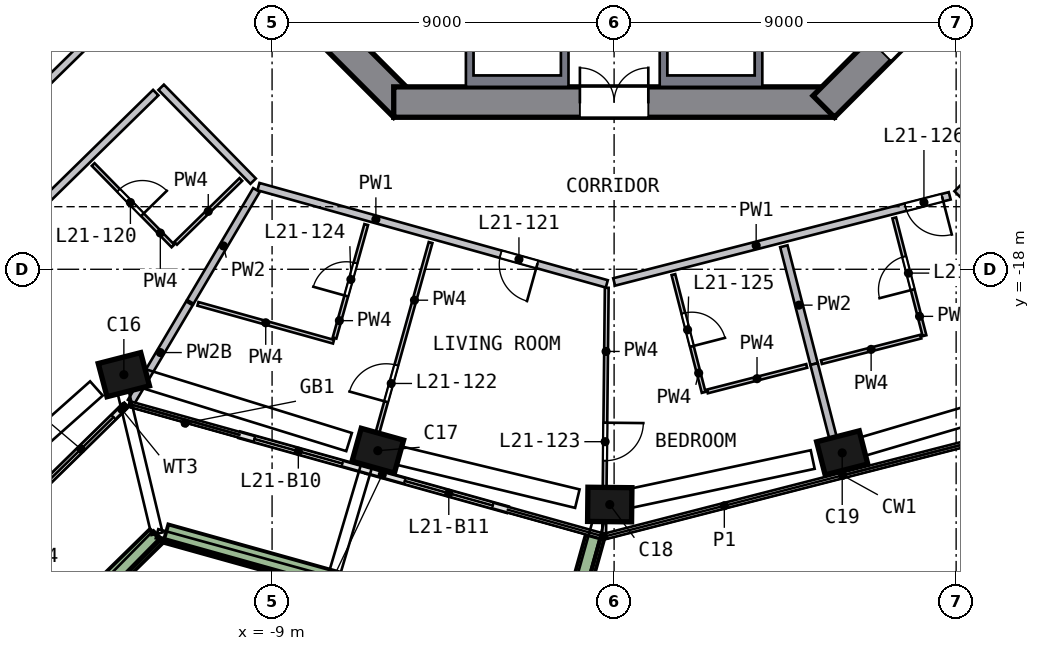
"""IFC4 building model, lengths in metres.
Left out: names, types, materials, properties, quantities, classifications, styles, units other than length and angle.
Written with IfcOpenShell. Run it as: python <this file> out.ifc"""

import sys

from ifc_helpers import new_model, si_unit, direction, frame, frame_2d, origin, origin_2d, place, context, subcontext, project, spatial, polyline, rectangle, outline, extrude, element, fill, save


model = new_model("IFC4")
c1 = context("Model", 3, precision=1e-05, world=origin(), true_north=direction((0.0, 1.0)))
c2 = subcontext(c1, "Body", "Model", "MODEL_VIEW")
j1 = project(units=[si_unit("LENGTHUNIT", "METRE"), si_unit("PLANEANGLEUNIT", "RADIAN")], contexts=[c1])
p1 = place(None, origin())
s1 = spatial("IfcSite", under=j1, at=p1, CompositionType="ELEMENT")
p2 = place(p1, origin())
s2 = spatial("IfcBuilding", under=s1, at=p2, CompositionType="ELEMENT")
p3 = place(p2, frame((0.0, 0.0, 93.0)))
s3 = spatial("IfcBuildingStorey", under=s2, at=p3, CompositionType="ELEMENT", Elevation=93.0)
p4 = place(p3, frame((-13.02, -20.7, 0.0), z_axis=(0.098896689, -0.061040769, 0.993223776), x_axis=(-0.963723758, -0.254530475, 0.080316596)))
e1 = element("IfcColumn", 1, at=p4, inside=s3, PredefinedType="COLUMN", context=c2, shape_type="SweptSolid", body=[
    extrude(rectangle(XDim=1.15, YDim=0.9, at=origin_2d()), origin(), (0.0, 0.0, 1.0), 3.212),
])
p5 = place(p3, frame((-6.349, -22.739, 0.0), z_axis=(0.108372319, -0.029279539, 0.993679098), x_axis=(0.957051078, -0.267305592, -0.112253975)))
e2 = element("IfcColumn", 2, at=p5, inside=s3, PredefinedType="COLUMN", context=c2, shape_type="SweptSolid", body=[
    extrude(rectangle(XDim=1.15, YDim=0.9, at=origin_2d()), origin(), (0.0, 0.0, 1.0), 3.21),
])
p6 = place(p3, frame((-0.253, -24.191, 0.0), z_axis=(0.11510311, -0.000228077, 0.993353523), x_axis=(-0.993299538, 0.010401576, 0.115099243)))
e3 = element("IfcColumn", 3, at=p6, inside=s3, PredefinedType="COLUMN", context=c2, shape_type="SweptSolid", body=[
    extrude(rectangle(XDim=1.15, YDim=0.9, at=origin_2d()), origin(), (0.0, 0.0, 1.0), 3.211),
])
p7 = place(p3, frame((5.871, -22.867, 0.0), z_axis=(0.108524069, 0.028823141, 0.993675879), x_axis=(0.962510976, 0.246911463, -0.112282459)))
e4 = element("IfcColumn", 4, at=p7, inside=s3, PredefinedType="COLUMN", context=c2, shape_type="SweptSolid", body=[
    extrude(rectangle(XDim=1.15, YDim=0.9, at=origin_2d()), origin(), (0.0, 0.0, 1.0), 3.21),
])
p8 = place(p3, frame((-13.717, -5.516, 0.0), z_axis=(0.0, 0.0, 1.0), x_axis=(0.707106781, -0.707106781, 0.0)))
e5 = element("IfcWall", 5, at=p8, inside=s3, PredefinedType="SHEAR", context=c2, shape_type="SweptSolid", body=[
    extrude(rectangle(XDim=11.598, YDim=0.8, at=frame_2d((5.799, 0.0))), origin(), (0.0, 0.0, 1.0), 3.5),
])
p9 = place(p8, frame((2.099, 0.0, 0.0)))
e6 = element("IfcOpeningElement", 6, at=p9, cuts=e5, PredefinedType="OPENING", context=c2, shape_type="SweptSolid", body=[
    extrude(rectangle(XDim=1.2, YDim=2.1, at=frame_2d((0.6, 1.05))), frame((0.0, 0.41, 0.0), z_axis=(0.0, -1.0, 0.0), x_axis=(1.0, 0.0, 0.0)), (0.0, 0.0, 1.0), 0.82),
])
p10 = place(p3, frame((-5.799, -13.6, 0.0), z_axis=(0.0, 0.0, 1.0), x_axis=(1.0, 0.0, 0.0)))
e7 = element("IfcWall", 7, at=p10, inside=s3, PredefinedType="SHEAR", context=c2, shape_type="SweptSolid", body=[
    extrude(rectangle(XDim=11.598, YDim=0.8, at=frame_2d((5.799, 0.0))), origin(), (0.0, 0.0, 1.0), 3.5),
])
p11 = place(p10, frame((4.899, 0.0, 0.0)))
e8 = element("IfcOpeningElement", 8, at=p11, cuts=e7, PredefinedType="OPENING", context=c2, shape_type="SweptSolid", body=[
    extrude(rectangle(XDim=1.8, YDim=2.1, at=frame_2d((0.9, 1.05))), frame((0.0, 0.41, 0.0), z_axis=(0.0, -1.0, 0.0), x_axis=(1.0, 0.0, 0.0)), (0.0, 0.0, 1.0), 0.82),
])
p12 = place(p3, frame((5.516, -13.717, 0.0), z_axis=(0.0, 0.0, 1.0), x_axis=(0.707106781, 0.707106781, 0.0)))
e9 = element("IfcWall", 9, at=p12, inside=s3, PredefinedType="SHEAR", context=c2, shape_type="SweptSolid", body=[
    extrude(rectangle(XDim=11.598, YDim=0.8, at=frame_2d((5.799, 0.0))), origin(), (0.0, 0.0, 1.0), 3.5),
])
p13 = place(p12, frame((2.099, 0.0, 0.0)))
e10 = element("IfcOpeningElement", 10, at=p13, cuts=e9, PredefinedType="OPENING", context=c2, shape_type="SweptSolid", body=[
    extrude(rectangle(XDim=1.2, YDim=2.1, at=frame_2d((0.6, 1.05))), frame((0.0, 0.41, 0.0), z_axis=(0.0, -1.0, 0.0), x_axis=(1.0, 0.0, 0.0)), (0.0, 0.0, 1.0), 0.82),
])
p14 = place(p3, frame((-15.173, -23.851, 0.0), z_axis=(0.0, 0.0, 1.0), x_axis=(0.714468315, 0.699667797, 0.0)))
e11 = element("IfcWall", 11, at=p14, inside=s3, PredefinedType="SOLIDWALL", context=c2, shape_type="SweptSolid", body=[
    extrude(rectangle(XDim=3.2, YDim=0.15, at=frame_2d((1.6, 0.0))), origin(), (0.0, 0.0, 1.0), 2.425),
])
p15 = place(p14, frame((0.4, 0.0, 0.0)))
e12 = element("IfcOpeningElement", 12, at=p15, cuts=e11, PredefinedType="OPENING", context=c2, shape_type="SweptSolid", body=[
    extrude(rectangle(XDim=2.4, YDim=2.4, at=frame_2d((1.2, 1.2))), frame((0.0, 0.085, 0.0), z_axis=(0.0, -1.0, 0.0), x_axis=(1.0, 0.0, 0.0)), (0.0, 0.0, 1.0), 0.17),
])
p16 = place(p3, frame((-9.85, -22.358, 0.0), z_axis=(0.0, 0.0, 1.0), x_axis=(0.96315568, -0.268944485, 0.0)))
e13 = element("IfcWall", 13, at=p16, inside=s3, PredefinedType="SOLIDWALL", context=c2, shape_type="SweptSolid", body=[
    extrude(rectangle(XDim=3.475, YDim=0.15, at=frame_2d((1.737, 0.0))), origin(), (0.0, 0.0, 1.0), 2.425),
])
p17 = place(p16, frame((0.4, 0.0, 0.0)))
e14 = element("IfcOpeningElement", 14, at=p17, cuts=e13, PredefinedType="OPENING", context=c2, shape_type="SweptSolid", body=[
    extrude(rectangle(XDim=2.4, YDim=2.4, at=frame_2d((1.2, 1.2))), frame((0.0, 0.085, 0.0), z_axis=(0.0, -1.0, 0.0), x_axis=(1.0, 0.0, 0.0)), (0.0, 0.0, 1.0), 0.17),
])
p18 = place(p3, frame((-6.503, -23.292, 0.0), z_axis=(0.0, 0.0, 1.0), x_axis=(0.963161418, -0.268923935, 0.0)))
e15 = element("IfcWall", 15, at=p18, inside=s3, PredefinedType="SOLIDWALL", context=c2, shape_type="SweptSolid", body=[
    extrude(rectangle(XDim=3.836, YDim=0.15, at=frame_2d((1.918, 0.0))), origin(), (0.0, 0.0, 1.0), 2.425),
])
p19 = place(p18, frame((1.035, 0.0, 0.0)))
e16 = element("IfcOpeningElement", 16, at=p19, cuts=e15, PredefinedType="OPENING", context=c2, shape_type="SweptSolid", body=[
    extrude(rectangle(XDim=2.4, YDim=2.4, at=frame_2d((1.2, 1.2))), frame((0.0, 0.085, 0.0), z_axis=(0.0, -1.0, 0.0), x_axis=(1.0, 0.0, 0.0)), (0.0, 0.0, 1.0), 0.17),
])
p20 = place(p3, frame((-19.168, -31.997, 0.0), z_axis=(0.0, 0.0, 1.0), x_axis=(0.714470668, 0.699665395, 0.0)))
e17 = element("IfcWall", 17, at=p20, inside=s3, PredefinedType="SOLIDWALL", context=c2, shape_type="SweptSolid", body=[
    extrude(rectangle(XDim=9.977, YDim=0.5, at=frame_2d((4.988, 0.0))), origin(), (0.0, 0.0, 1.0), 0.7),
])
p21 = place(p3, frame((-11.798, -24.955, 0.0), z_axis=(0.0, 0.0, 1.0), x_axis=(0.963157935, -0.26893641, 0.0)))
e18 = element("IfcWall", 18, at=p21, inside=s3, PredefinedType="SOLIDWALL", context=c2, shape_type="SweptSolid", body=[
    extrude(rectangle(XDim=11.152, YDim=0.5, at=frame_2d((5.576, 0.0))), origin(), (0.0, 0.0, 1.0), 0.7),
])
p22 = place(p3, frame((-1.23, -27.646, 0.0), z_axis=(0.0, 0.0, 1.0), x_axis=(0.268921917, 0.963161982, 0.0)))
e19 = element("IfcWall", 19, at=p22, inside=s3, PredefinedType="SOLIDWALL", context=c2, shape_type="SweptSolid", body=[
    extrude(rectangle(XDim=2.699, YDim=0.5, at=frame_2d((1.35, 0.0))), origin(), (0.0, 0.0, 1.0), 0.7),
])
p23 = place(p3, origin())
e20 = element("IfcWall", 20, at=p23, inside=s3, PredefinedType="SOLIDWALL", context=c2, shape_type="SweptSolid", body=[
    extrude(outline(polyline([(-1.2, -13.2), (-3.9, -13.2), (-3.9, -10.7), (-1.2, -10.7), (-1.2, -13.2)]), holes=[polyline([(-3.7, -10.9), (-3.7, -12.9), (-1.4, -12.9), (-1.4, -10.9), (-3.7, -10.9)])]), origin(), (0.0, 0.0, 1.0), 3.19),
])
p24 = place(p3, origin())
e21 = element("IfcWall", 21, at=p24, inside=s3, PredefinedType="SOLIDWALL", context=c2, shape_type="SweptSolid", body=[
    extrude(outline(polyline([(3.9, -10.7), (3.9, -13.2), (1.2, -13.2), (1.2, -10.7), (3.9, -10.7)]), holes=[polyline([(1.4, -12.9), (3.7, -12.9), (3.7, -10.9), (1.4, -10.9), (1.4, -12.9)])]), origin(), (0.0, 0.0, 1.0), 3.19),
])
p25 = place(p3, frame((-26.907, -24.809, 0.0), z_axis=(0.0, 0.0, 1.0), x_axis=(0.714474521, 0.699661461, 0.0)))
e22 = element("IfcWall", 22, at=p25, inside=s3, PredefinedType="SOLIDWALL", context=c2, shape_type="SweptSolid", body=[
    extrude(rectangle(XDim=18.624, YDim=0.2, at=frame_2d((9.312, 0.0))), origin(), (0.0, 0.0, 1.0), 3.19),
])
p26 = place(p25, frame((2.6, 0.0, 0.0)))
e23 = element("IfcOpeningElement", 23, at=p26, cuts=e22, PredefinedType="OPENING", context=c2, shape_type="SweptSolid", body=[
    extrude(rectangle(XDim=1.0, YDim=2.1, at=frame_2d((0.5, 1.05))), frame((0.0, 0.11, 0.0), z_axis=(0.0, -1.0, 0.0), x_axis=(1.0, 0.0, 0.0)), (0.0, 0.0, 1.0), 0.22),
])
p27 = place(p3, frame((-12.061, -13.351, 0.0), z_axis=(0.0, 0.0, 1.0), x_axis=(-0.714474521, -0.699661461, 0.0)))
e24 = element("IfcWall", 24, at=p27, inside=s3, PredefinedType="SOLIDWALL", context=c2, shape_type="SweptSolid", body=[
    extrude(rectangle(XDim=18.624, YDim=0.2, at=frame_2d((9.312, 0.0))), origin(), (0.0, 0.0, 1.0), 3.19),
])
p28 = place(p27, frame((7.0, 0.0, 0.0)))
e25 = element("IfcOpeningElement", 25, at=p28, cuts=e24, PredefinedType="OPENING", context=c2, shape_type="SweptSolid", body=[
    extrude(rectangle(XDim=1.0, YDim=2.1, at=frame_2d((0.5, 1.05))), frame((0.0, 0.11, 0.0), z_axis=(0.0, -1.0, 0.0), x_axis=(1.0, 0.0, 0.0)), (0.0, 0.0, 1.0), 0.22),
])
p29 = place(p3, frame((-11.918, -13.211, 0.0), z_axis=(0.0, 0.0, 1.0), x_axis=(0.699655576, -0.714480283, 0.0)))
e26 = element("IfcWall", 26, at=p29, inside=s3, PredefinedType="SOLIDWALL", context=c2, shape_type="SweptSolid", body=[
    extrude(rectangle(XDim=3.458, YDim=0.2, at=frame_2d((1.729, 0.0))), origin(), (0.0, 0.0, 1.0), 3.19),
])
p30 = place(p3, frame((-0.192, -18.384, 0.0), z_axis=(0.0, 0.0, 1.0), x_axis=(-0.963160921, 0.268925714, 0.0)))
e27 = element("IfcWall", 27, at=p30, inside=s3, PredefinedType="SOLIDWALL", context=c2, shape_type="SweptSolid", body=[
    extrude(rectangle(XDim=9.517, YDim=0.2, at=frame_2d((4.758, 0.0))), origin(), (0.0, 0.0, 1.0), 3.19),
])
p31 = place(p30, frame((1.9, 0.0, 0.0)))
e28 = element("IfcOpeningElement", 28, at=p31, cuts=e27, PredefinedType="OPENING", context=c2, shape_type="SweptSolid", body=[
    extrude(rectangle(XDim=1.0, YDim=2.1, at=frame_2d((0.5, 1.05))), frame((0.0, 0.11, 0.0), z_axis=(0.0, -1.0, 0.0), x_axis=(1.0, 0.0, 0.0)), (0.0, 0.0, 1.0), 0.22),
])
p32 = place(p3, frame((8.831, -16.067, 0.0), z_axis=(0.0, 0.0, 1.0), x_axis=(-0.968582197, -0.248693643, 0.0)))
e29 = element("IfcWall", 29, at=p32, inside=s3, PredefinedType="SOLIDWALL", context=c2, shape_type="SweptSolid", body=[
    extrude(rectangle(XDim=9.116, YDim=0.2, at=frame_2d((4.558, 0.0))), origin(), (0.0, 0.0, 1.0), 3.19),
])
p33 = place(p32, frame((0.2, 0.0, 0.0)))
e30 = element("IfcOpeningElement", 30, at=p33, cuts=e29, PredefinedType="OPENING", context=c2, shape_type="SweptSolid", body=[
    extrude(rectangle(XDim=1.0, YDim=2.1, at=frame_2d((0.5, 1.05))), frame((0.0, 0.11, 0.0), z_axis=(0.0, -1.0, 0.0), x_axis=(1.0, 0.0, 0.0)), (0.0, 0.0, 1.0), 0.22),
])
p34 = place(p3, frame((9.025, -16.017, 0.0), z_axis=(0.0, 0.0, 1.0), x_axis=(0.714482371, 0.699653444, 0.0)))
e31 = element("IfcWall", 31, at=p34, inside=s3, PredefinedType="SOLIDWALL", context=c2, shape_type="SweptSolid", body=[
    extrude(rectangle(XDim=9.516, YDim=0.2, at=frame_2d((4.758, 0.0))), origin(), (0.0, 0.0, 1.0), 3.19),
])
p35 = place(p3, frame((-11.175, -18.896, 0.0), z_axis=(0.0, 0.0, 1.0), x_axis=(-0.509048846, -0.860737633, 0.0)))
e32 = element("IfcWall", 32, at=p35, inside=s3, PredefinedType="SOLIDWALL", context=c2, shape_type="SweptSolid", body=[
    extrude(rectangle(XDim=3.011, YDim=0.2, at=frame_2d((1.506, 0.0))), origin(), (0.0, 0.0, 1.0), 2.69),
])
p36 = place(p3, frame((-9.411, -15.914, 0.0), z_axis=(0.0, 0.0, 1.0), x_axis=(-0.50904451, -0.860740197, 0.0)))
e33 = element("IfcWall", 33, at=p36, inside=s3, PredefinedType="SOLIDWALL", context=c2, shape_type="SweptSolid", body=[
    extrude(rectangle(XDim=3.418, YDim=0.2, at=frame_2d((1.709, 0.0))), origin(), (0.0, 0.0, 1.0), 3.19),
])
p37 = place(p3, frame((4.466, -17.394, 0.0), z_axis=(0.0, 0.0, 1.0), x_axis=(0.248705722, -0.968579095, 0.0)))
e34 = element("IfcWall", 34, at=p37, inside=s3, PredefinedType="SOLIDWALL", context=c2, shape_type="SweptSolid", body=[
    extrude(rectangle(XDim=3.2, YDim=0.2, at=frame_2d((1.6, 0.0))), origin(), (0.0, 0.0, 1.0), 3.19),
])
p38 = place(p3, frame((5.262, -20.494, 0.0), z_axis=(0.0, 0.0, 1.0), x_axis=(0.248703888, -0.968579566, 0.0)))
e35 = element("IfcWall", 35, at=p38, inside=s3, PredefinedType="SOLIDWALL", context=c2, shape_type="SweptSolid", body=[
    extrude(rectangle(XDim=2.95, YDim=0.2, at=frame_2d((1.475, 0.0))), origin(), (0.0, 0.0, 1.0), 3.19),
])
p39 = place(p3, frame((-13.708, -15.243, 0.0), z_axis=(0.0, 0.0, 1.0), x_axis=(0.699703553, -0.714433298, 0.0)))
e36 = element("IfcWall", 36, at=p39, inside=s3, PredefinedType="PARTITIONING", context=c2, shape_type="SweptSolid", body=[
    extrude(rectangle(XDim=3.0, YDim=0.1, at=frame_2d((1.5, 0.0))), origin(), (0.0, 0.0, 1.0), 3.19),
])
p40 = place(p39, frame((0.95, 0.0, 0.0)))
e37 = element("IfcOpeningElement", 37, at=p40, cuts=e36, PredefinedType="OPENING", context=c2, shape_type="SweptSolid", body=[
    extrude(rectangle(XDim=0.9, YDim=2.1, at=frame_2d((0.45, 1.05))), frame((0.0, 0.06, 0.0), z_axis=(0.0, -1.0, 0.0), x_axis=(1.0, 0.0, 0.0)), (0.0, 0.0, 1.0), 0.12),
])
p41 = place(p3, frame((-9.822, -15.637, 0.0), z_axis=(0.0, 0.0, 1.0), x_axis=(-0.714443678, -0.699692954, 0.0)))
e38 = element("IfcWall", 38, at=p41, inside=s3, PredefinedType="PARTITIONING", context=c2, shape_type="SweptSolid", body=[
    extrude(rectangle(XDim=2.4, YDim=0.1, at=frame_2d((1.2, 0.0))), origin(), (0.0, 0.0, 1.0), 3.19),
])
p42 = place(p3, frame((-10.951, -18.91, 0.0), z_axis=(0.0, 0.0, 1.0), x_axis=(0.963158191, -0.268935493, 0.0)))
e39 = element("IfcWall", 39, at=p42, inside=s3, PredefinedType="PARTITIONING", context=c2, shape_type="SweptSolid", body=[
    extrude(rectangle(XDim=3.704, YDim=0.1, at=frame_2d((1.852, 0.0))), origin(), (0.0, 0.0, 1.0), 3.19),
])
p43 = place(p3, frame((-7.357, -19.81, 0.0), z_axis=(0.0, 0.0, 1.0), x_axis=(0.268943392, 0.963155985, 0.0)))
e40 = element("IfcWall", 40, at=p43, inside=s3, PredefinedType="PARTITIONING", context=c2, shape_type="SweptSolid", body=[
    extrude(rectangle(XDim=3.1, YDim=0.1, at=frame_2d((1.55, 0.0))), origin(), (0.0, 0.0, 1.0), 3.19),
])
p44 = place(p43, frame((1.15, 0.0, 0.0)))
e41 = element("IfcOpeningElement", 41, at=p44, cuts=e40, PredefinedType="OPENING", context=c2, shape_type="SweptSolid", body=[
    extrude(rectangle(XDim=0.9, YDim=2.1, at=frame_2d((0.45, 1.05))), frame((0.0, 0.06, 0.0), z_axis=(0.0, -1.0, 0.0), x_axis=(1.0, 0.0, 0.0)), (0.0, 0.0, 1.0), 0.12),
])
p45 = place(p3, frame((-6.483, -23.22, 0.0), z_axis=(0.0, 0.0, 1.0), x_axis=(0.268917165, 0.963163308, 0.0)))
e42 = element("IfcWall", 42, at=p45, inside=s3, PredefinedType="PARTITIONING", context=c2, shape_type="SweptSolid", body=[
    extrude(rectangle(XDim=6.15, YDim=0.1, at=frame_2d((3.075, 0.0))), origin(), (0.0, 0.0, 1.0), 3.19),
])
p46 = place(p45, frame((1.8, 0.0, 0.0)))
e43 = element("IfcOpeningElement", 43, at=p46, cuts=e42, PredefinedType="OPENING", context=c2, shape_type="SweptSolid", body=[
    extrude(rectangle(XDim=1.0, YDim=2.1, at=frame_2d((0.5, 1.05))), frame((0.0, 0.06, 0.0), z_axis=(0.0, -1.0, 0.0), x_axis=(1.0, 0.0, 0.0)), (0.0, 0.0, 1.0), 0.12),
])
p47 = place(p3, frame((-0.194, -18.487, 0.0), z_axis=(0.0, 0.0, 1.0), x_axis=(-0.010480893, -0.999945074, 0.0)))
e44 = element("IfcWall", 44, at=p47, inside=s3, PredefinedType="PARTITIONING", context=c2, shape_type="SweptSolid", body=[
    extrude(rectangle(XDim=6.476, YDim=0.1, at=frame_2d((3.238, 0.0))), origin(), (0.0, 0.0, 1.0), 3.19),
])
p48 = place(p47, frame((3.55, 0.0, 0.0)))
e45 = element("IfcOpeningElement", 45, at=p48, cuts=e44, PredefinedType="OPENING", context=c2, shape_type="SweptSolid", body=[
    extrude(rectangle(XDim=1.0, YDim=2.1, at=frame_2d((0.5, 1.05))), frame((0.0, 0.06, 0.0), z_axis=(0.0, -1.0, 0.0), x_axis=(1.0, 0.0, 0.0)), (0.0, 0.0, 1.0), 0.12),
])
p49 = place(p3, frame((1.56, -18.14, 0.0), z_axis=(0.0, 0.0, 1.0), x_axis=(0.248705722, -0.968579095, 0.0)))
e46 = element("IfcWall", 46, at=p49, inside=s3, PredefinedType="PARTITIONING", context=c2, shape_type="SweptSolid", body=[
    extrude(rectangle(XDim=3.2, YDim=0.1, at=frame_2d((1.6, 0.0))), origin(), (0.0, 0.0, 1.0), 3.19),
])
p50 = place(p49, frame((1.05, 0.0, 0.0)))
e47 = element("IfcOpeningElement", 47, at=p50, cuts=e46, PredefinedType="OPENING", context=c2, shape_type="SweptSolid", body=[
    extrude(rectangle(XDim=0.9, YDim=2.1, at=frame_2d((0.45, 1.05))), frame((0.0, 0.06, 0.0), z_axis=(0.0, -1.0, 0.0), x_axis=(1.0, 0.0, 0.0)), (0.0, 0.0, 1.0), 0.12),
])
p51 = place(p3, frame((2.453, -21.215, 0.0), z_axis=(0.0, 0.0, 1.0), x_axis=(0.968569528, 0.248742977, 0.0)))
e48 = element("IfcWall", 48, at=p51, inside=s3, PredefinedType="PARTITIONING", context=c2, shape_type="SweptSolid", body=[
    extrude(rectangle(XDim=2.7, YDim=0.1, at=frame_2d((1.35, 0.0))), origin(), (0.0, 0.0, 1.0), 3.19),
])
p52 = place(p3, frame((8.071, -19.772, 0.0), z_axis=(0.0, 0.0, 1.0), x_axis=(-0.968591309, -0.24865815, 0.0)))
e49 = element("IfcWall", 49, at=p52, inside=s3, PredefinedType="PARTITIONING", context=c2, shape_type="SweptSolid", body=[
    extrude(rectangle(XDim=2.7, YDim=0.1, at=frame_2d((1.35, 0.0))), origin(), (0.0, 0.0, 1.0), 3.19),
])
p53 = place(p3, frame((8.167, -19.748, 0.0), z_axis=(0.0, 0.0, 1.0), x_axis=(-0.248652523, 0.968592754, 0.0)))
e50 = element("IfcWall", 50, at=p53, inside=s3, PredefinedType="PARTITIONING", context=c2, shape_type="SweptSolid", body=[
    extrude(rectangle(XDim=3.2, YDim=0.1, at=frame_2d((1.6, 0.0))), origin(), (0.0, 0.0, 1.0), 3.19),
])
p54 = place(p53, frame((1.25, 0.0, 0.0)))
e51 = element("IfcOpeningElement", 51, at=p54, cuts=e50, PredefinedType="OPENING", context=c2, shape_type="SweptSolid", body=[
    extrude(rectangle(XDim=0.9, YDim=2.1, at=frame_2d((0.45, 1.05))), frame((0.0, 0.06, 0.0), z_axis=(0.0, -1.0, 0.0), x_axis=(1.0, 0.0, 0.0)), (0.0, 0.0, 1.0), 0.12),
])
p55 = place(p15, origin())
e52 = element("IfcDoor", 52, at=p55, inside=s3, OperationType="SLIDING_TO_RIGHT", PredefinedType="DOOR", context=c2, shape_type="SweptSolid", body=[
    extrude(rectangle(XDim=2.4, YDim=2.4, at=frame_2d((1.2, 1.2))), frame((0.0, 0.025, 0.0), z_axis=(0.0, -1.0, 0.0), x_axis=(1.0, 0.0, 0.0)), (0.0, 0.0, 1.0), 0.05),
])
fill(e12, e52)
p56 = place(p17, origin())
e53 = element("IfcDoor", 53, at=p56, inside=s3, OperationType="SLIDING_TO_RIGHT", PredefinedType="DOOR", context=c2, shape_type="SweptSolid", body=[
    extrude(rectangle(XDim=2.4, YDim=2.4, at=frame_2d((1.2, 1.2))), frame((0.0, 0.025, 0.0), z_axis=(0.0, -1.0, 0.0), x_axis=(1.0, 0.0, 0.0)), (0.0, 0.0, 1.0), 0.05),
])
fill(e14, e53)
p57 = place(p19, origin())
e54 = element("IfcDoor", 54, at=p57, inside=s3, OperationType="SLIDING_TO_LEFT", PredefinedType="DOOR", context=c2, shape_type="SweptSolid", body=[
    extrude(rectangle(XDim=2.4, YDim=2.4, at=frame_2d((1.2, 1.2))), frame((0.0, 0.025, 0.0), z_axis=(0.0, -1.0, 0.0), x_axis=(1.0, 0.0, 0.0)), (0.0, 0.0, 1.0), 0.05),
])
fill(e16, e54)
p58 = place(p11, origin())
e55 = element("IfcDoor", 55, at=p58, inside=s3, OperationType="DOUBLE_DOOR_SINGLE_SWING", PredefinedType="DOOR", context=c2, shape_type="SweptSolid", body=[
    extrude(rectangle(XDim=1.8, YDim=2.1, at=frame_2d((0.9, 1.05))), frame((0.0, 0.025, 0.0), z_axis=(0.0, -1.0, 0.0), x_axis=(1.0, 0.0, 0.0)), (0.0, 0.0, 1.0), 0.05),
])
fill(e8, e55)
p59 = place(p40, origin())
e56 = element("IfcDoor", 56, at=p59, inside=s3, OperationType="SINGLE_SWING_RIGHT", PredefinedType="DOOR", context=c2, shape_type="SweptSolid", body=[
    extrude(rectangle(XDim=0.9, YDim=2.1, at=frame_2d((0.45, 1.05))), frame((0.0, 0.025, 0.0), z_axis=(0.0, -1.0, 0.0), x_axis=(1.0, 0.0, 0.0)), (0.0, 0.0, 1.0), 0.05),
])
fill(e37, e56)
p60 = place(p31, origin())
e57 = element("IfcDoor", 57, at=p60, inside=s3, OperationType="SINGLE_SWING_LEFT", PredefinedType="DOOR", context=c2, shape_type="SweptSolid", body=[
    extrude(rectangle(XDim=1.0, YDim=2.1, at=frame_2d((0.5, 1.05))), frame((0.0, 0.025, 0.0), z_axis=(0.0, -1.0, 0.0), x_axis=(1.0, 0.0, 0.0)), (0.0, 0.0, 1.0), 0.05),
])
fill(e28, e57)
p61 = place(p46, origin())
e58 = element("IfcDoor", 58, at=p61, inside=s3, OperationType="SINGLE_SWING_LEFT", PredefinedType="DOOR", context=c2, shape_type="SweptSolid", body=[
    extrude(rectangle(XDim=1.0, YDim=2.1, at=frame_2d((0.5, 1.05))), frame((0.0, 0.025, 0.0), z_axis=(0.0, -1.0, 0.0), x_axis=(1.0, 0.0, 0.0)), (0.0, 0.0, 1.0), 0.05),
])
fill(e43, e58)
p62 = place(p48, origin())
e59 = element("IfcDoor", 59, at=p62, inside=s3, OperationType="SINGLE_SWING_LEFT", PredefinedType="DOOR", context=c2, shape_type="SweptSolid", body=[
    extrude(rectangle(XDim=1.0, YDim=2.1, at=frame_2d((0.5, 1.05))), frame((0.0, 0.025, 0.0), z_axis=(0.0, -1.0, 0.0), x_axis=(1.0, 0.0, 0.0)), (0.0, 0.0, 1.0), 0.05),
])
fill(e45, e59)
p63 = place(p44, origin())
e60 = element("IfcDoor", 60, at=p63, inside=s3, OperationType="SINGLE_SWING_LEFT", PredefinedType="DOOR", context=c2, shape_type="SweptSolid", body=[
    extrude(rectangle(XDim=0.9, YDim=2.1, at=frame_2d((0.45, 1.05))), frame((0.0, 0.025, 0.0), z_axis=(0.0, -1.0, 0.0), x_axis=(1.0, 0.0, 0.0)), (0.0, 0.0, 1.0), 0.05),
])
fill(e41, e60)
p64 = place(p50, origin())
e61 = element("IfcDoor", 61, at=p64, inside=s3, OperationType="SINGLE_SWING_RIGHT", PredefinedType="DOOR", context=c2, shape_type="SweptSolid", body=[
    extrude(rectangle(XDim=0.9, YDim=2.1, at=frame_2d((0.45, 1.05))), frame((0.0, 0.025, 0.0), z_axis=(0.0, -1.0, 0.0), x_axis=(1.0, 0.0, 0.0)), (0.0, 0.0, 1.0), 0.05),
])
fill(e47, e61)
p65 = place(p33, origin())
e62 = element("IfcDoor", 62, at=p65, inside=s3, OperationType="SINGLE_SWING_LEFT", PredefinedType="DOOR", context=c2, shape_type="SweptSolid", body=[
    extrude(rectangle(XDim=1.0, YDim=2.1, at=frame_2d((0.5, 1.05))), frame((0.0, 0.025, 0.0), z_axis=(0.0, -1.0, 0.0), x_axis=(1.0, 0.0, 0.0)), (0.0, 0.0, 1.0), 0.05),
])
fill(e30, e62)
p66 = place(p54, origin())
e63 = element("IfcDoor", 63, at=p66, inside=s3, OperationType="SINGLE_SWING_LEFT", PredefinedType="DOOR", context=c2, shape_type="SweptSolid", body=[
    extrude(rectangle(XDim=0.9, YDim=2.1, at=frame_2d((0.45, 1.05))), frame((0.0, 0.025, 0.0), z_axis=(0.0, -1.0, 0.0), x_axis=(1.0, 0.0, 0.0)), (0.0, 0.0, 1.0), 0.05),
])
fill(e51, e63)
save(model, sys.argv[1])
